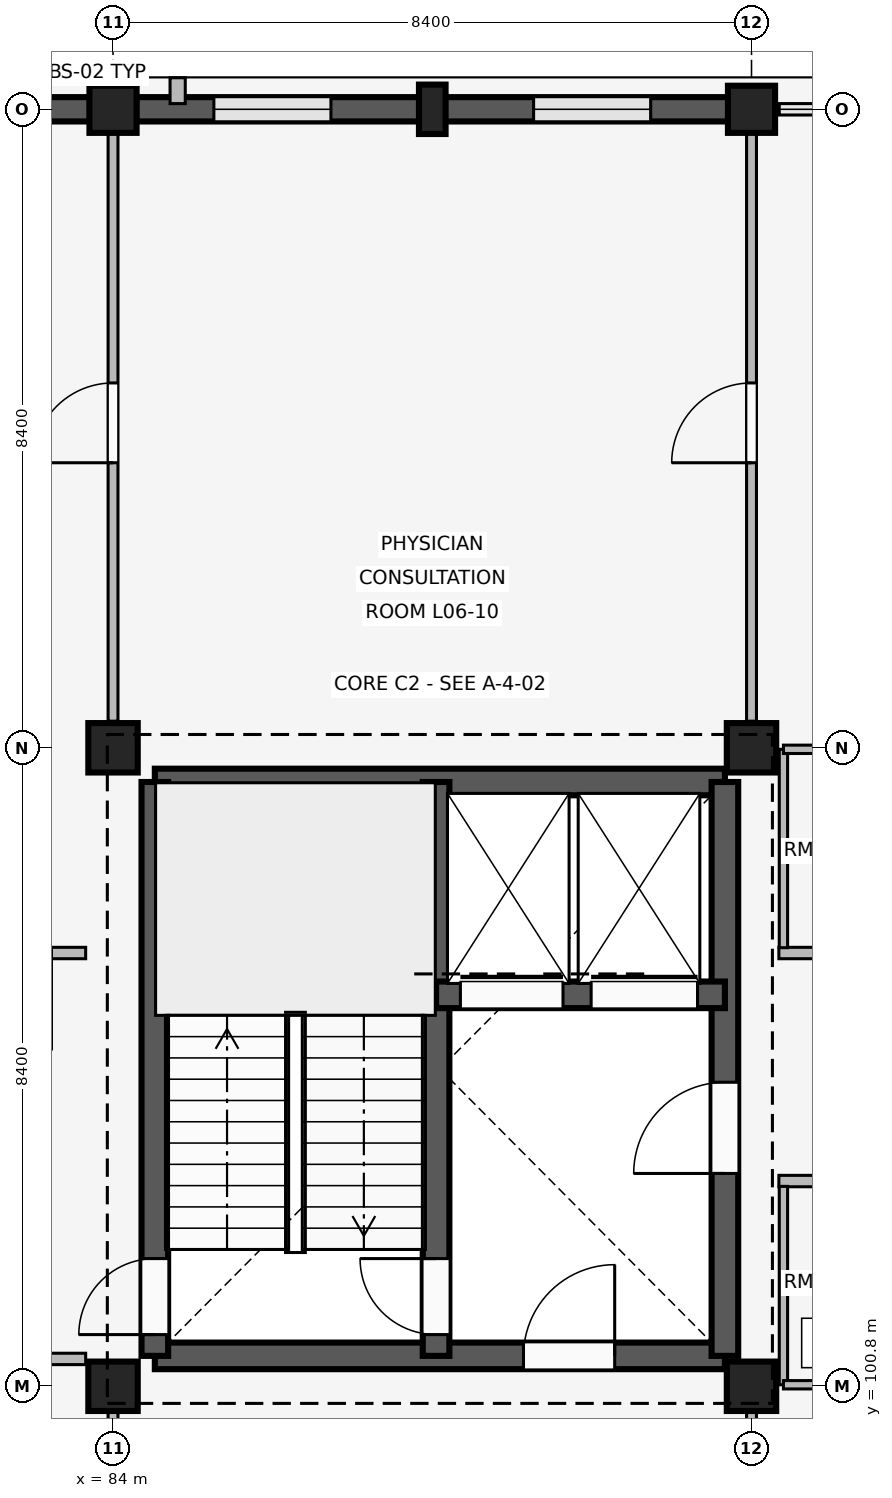
"""IFC4 building model, lengths in metres.
Left out: names, types, materials, properties, quantities, classifications, styles, units other than length and angle.
Written with IfcOpenShell. Run it as: python <this file> out.ifc"""

import sys

from ifc_helpers import new_model, si_unit, direction, frame, frame_2d, origin, origin_2d, place, context, subcontext, project, spatial, rectangle, extrude, element, fill, save


model = new_model("IFC4")
c1 = context("Model", 3, precision=1e-05, world=origin(), true_north=direction((0.0, 1.0)))
c2 = subcontext(c1, "Body", "Model", "MODEL_VIEW")
j1 = project(units=[si_unit("LENGTHUNIT", "METRE"), si_unit("PLANEANGLEUNIT", "RADIAN")], contexts=[c1])
p1 = place(None, origin())
s1 = spatial("IfcSite", under=j1, at=p1, CompositionType="ELEMENT")
p2 = place(p1, origin())
s2 = spatial("IfcBuilding", under=s1, at=p2, CompositionType="ELEMENT")
p3 = place(p2, frame((0.0, 0.0, 24.6)))
s3 = spatial("IfcBuildingStorey", under=s2, at=p3, CompositionType="ELEMENT", Elevation=24.6)
for number, where, z_axis, x_axis in (
    (1, (84.0, 100.8, 0.0), (0.0, 0.0, 1.0), (1.0, 0.0, 0.0)),
    (2, (84.0, 109.2, 0.0), (0.0, 0.0, 1.0), (1.0, 0.0, 0.0)),
):
    element("IfcColumn", number, at=place(p3, frame(where, z_axis=z_axis, x_axis=x_axis)), inside=s3, PredefinedType="COLUMN", context=c2, shape_type="SweptSolid", body=[
        extrude(rectangle(XDim=0.65, YDim=0.65, at=origin_2d()), origin(), (0.0, 0.0, 1.0), 4.2),
    ])
p4 = place(p3, frame((84.0, 117.6, 0.0), z_axis=(0.0, 0.0, 1.0), x_axis=(1.0, 0.0, 0.0)))
e3 = element("IfcColumn", 3, at=p4, inside=s3, PredefinedType="COLUMN", context=c2, shape_type="SweptSolid", body=[
    extrude(rectangle(XDim=0.62, YDim=0.62, at=origin_2d()), origin(), (0.0, 0.0, 1.0), 4.2),
])
for number, where, z_axis, x_axis in (
    (4, (92.4, 100.8, 0.0), (0.0, 0.0, 1.0), (1.0, 0.0, 0.0)),
    (5, (92.4, 109.2, 0.0), (0.0, 0.0, 1.0), (1.0, 0.0, 0.0)),
):
    element("IfcColumn", number, at=place(p3, frame(where, z_axis=z_axis, x_axis=x_axis)), inside=s3, PredefinedType="COLUMN", context=c2, shape_type="SweptSolid", body=[
        extrude(rectangle(XDim=0.65, YDim=0.65, at=origin_2d()), origin(), (0.0, 0.0, 1.0), 4.2),
    ])
p5 = place(p3, frame((92.4, 117.6, 0.0), z_axis=(0.0, 0.0, 1.0), x_axis=(1.0, 0.0, 0.0)))
e6 = element("IfcColumn", 6, at=p5, inside=s3, PredefinedType="COLUMN", context=c2, shape_type="SweptSolid", body=[
    extrude(rectangle(XDim=0.62, YDim=0.62, at=origin_2d()), origin(), (0.0, 0.0, 1.0), 4.2),
])
p6 = place(p3, frame((88.2, 117.6, 0.0), z_axis=(0.0, 0.0, 1.0), x_axis=(1.0, 0.0, 0.0)))
e7 = element("IfcColumn", 7, at=p6, inside=s3, PredefinedType="PILASTER", context=c2, shape_type="SweptSolid", body=[
    extrude(rectangle(XDim=0.35, YDim=0.65, at=origin_2d()), origin(), (0.0, 0.0, 1.0), 4.2),
])
p7 = place(p3, frame((75.905, 117.6, 0.0), z_axis=(0.0, 0.0, 1.0), x_axis=(1.0, 0.0, 0.0)))
e8 = element("IfcWall", 8, at=p7, inside=s3, PredefinedType="SOLIDWALL", context=c2, shape_type="SweptSolid", body=[
    extrude(rectangle(XDim=7.79, YDim=0.32, at=frame_2d((3.895, 0.0))), origin(), (0.0, 0.0, 1.0), 3.34),
])
p8 = place(p7, frame((0.962, 0.0, 0.85)))
e9 = element("IfcOpeningElement", 9, at=p8, cuts=e8, PredefinedType="OPENING", context=c2, shape_type="SweptSolid", body=[
    extrude(rectangle(XDim=1.66, YDim=1.95, at=frame_2d((0.83, 0.975))), frame((0.0, 0.17, 0.0), z_axis=(0.0, -1.0, 0.0), x_axis=(1.0, 0.0, 0.0)), (0.0, 0.0, 1.0), 0.34),
])
p9 = place(p7, frame((5.168, 0.0, 0.85)))
e10 = element("IfcOpeningElement", 10, at=p9, cuts=e8, PredefinedType="OPENING", context=c2, shape_type="SweptSolid", body=[
    extrude(rectangle(XDim=1.66, YDim=1.95, at=frame_2d((0.83, 0.975))), frame((0.0, 0.17, 0.0), z_axis=(0.0, -1.0, 0.0), x_axis=(1.0, 0.0, 0.0)), (0.0, 0.0, 1.0), 0.34),
])
p10 = place(p3, frame((84.305, 117.6, 0.0), z_axis=(0.0, 0.0, 1.0), x_axis=(1.0, 0.0, 0.0)))
e11 = element("IfcWall", 11, at=p10, inside=s3, PredefinedType="SOLIDWALL", context=c2, shape_type="SweptSolid", body=[
    extrude(rectangle(XDim=7.79, YDim=0.32, at=frame_2d((3.895, 0.0))), origin(), (0.0, 0.0, 1.0), 3.34),
])
p11 = place(p10, frame((1.022, 0.0, 0.85)))
e12 = element("IfcOpeningElement", 12, at=p11, cuts=e11, PredefinedType="OPENING", context=c2, shape_type="SweptSolid", body=[
    extrude(rectangle(XDim=1.54, YDim=1.85, at=frame_2d((0.77, 0.925))), frame((0.0, 0.17, 0.0), z_axis=(0.0, -1.0, 0.0), x_axis=(1.0, 0.0, 0.0)), (0.0, 0.0, 1.0), 0.34),
])
p12 = place(p10, frame((5.228, 0.0, 0.85)))
e13 = element("IfcOpeningElement", 13, at=p12, cuts=e11, PredefinedType="OPENING", context=c2, shape_type="SweptSolid", body=[
    extrude(rectangle(XDim=1.54, YDim=1.85, at=frame_2d((0.77, 0.925))), frame((0.0, 0.17, 0.0), z_axis=(0.0, -1.0, 0.0), x_axis=(1.0, 0.0, 0.0)), (0.0, 0.0, 1.0), 0.34),
])
p13 = place(p3, frame((84.85, 117.675, 0.0), z_axis=(0.0, 0.0, 1.0), x_axis=(0.0, 1.0, 0.0)))
e14 = element("IfcWall", 14, at=p13, inside=s3, PredefinedType="ELEMENTEDWALL", context=c2, shape_type="SweptSolid", body=[
    extrude(rectangle(XDim=0.34, YDim=0.2, at=frame_2d((0.17, 0.0))), origin(), (0.0, 0.0, 1.0), 3.32),
])
p14 = place(p3, frame((84.55, 101.2, 0.0), z_axis=(0.0, 0.0, 1.0), x_axis=(1.0, 0.0, 0.0)))
e15 = element("IfcWall", 15, at=p14, inside=s3, PredefinedType="SHEAR", context=c2, shape_type="SweptSolid", body=[
    extrude(rectangle(XDim=7.5, YDim=0.35, at=frame_2d((3.75, 0.0))), origin(), (0.0, 0.0, 1.0), 3.92),
])
p15 = place(p14, frame((4.85, 0.0, 0.0)))
e16 = element("IfcOpeningElement", 16, at=p15, cuts=e15, PredefinedType="OPENING", context=c2, shape_type="SweptSolid", body=[
    extrude(rectangle(XDim=1.2, YDim=2.2, at=frame_2d((0.6, 1.1))), frame((0.0, 0.185, 0.0), z_axis=(0.0, -1.0, 0.0), x_axis=(1.0, 0.0, 0.0)), (0.0, 0.0, 1.0), 0.37),
])
p16 = place(p3, frame((84.55, 108.75, 0.0), z_axis=(0.0, 0.0, 1.0), x_axis=(1.0, 0.0, 0.0)))
e17 = element("IfcWall", 17, at=p16, inside=s3, PredefinedType="SHEAR", context=c2, shape_type="SweptSolid", body=[
    extrude(rectangle(XDim=7.5, YDim=0.35, at=frame_2d((3.75, 0.0))), origin(), (0.0, 0.0, 1.0), 3.92),
])
p17 = place(p3, frame((84.55, 101.2, 0.0), z_axis=(0.0, 0.0, 1.0), x_axis=(0.0, 1.0, 0.0)))
e18 = element("IfcWall", 18, at=p17, inside=s3, PredefinedType="SHEAR", context=c2, shape_type="SweptSolid", body=[
    extrude(rectangle(XDim=7.55, YDim=0.35, at=frame_2d((3.775, 0.0))), origin(), (0.0, 0.0, 1.0), 3.92),
])
p18 = place(p17, frame((0.28, 0.0, 0.0)))
e19 = element("IfcOpeningElement", 19, at=p18, cuts=e18, PredefinedType="OPENING", context=c2, shape_type="SweptSolid", body=[
    extrude(rectangle(XDim=1.0, YDim=2.15, at=frame_2d((0.5, 1.075))), frame((0.0, 0.185, 0.0), z_axis=(0.0, -1.0, 0.0), x_axis=(1.0, 0.0, 0.0)), (0.0, 0.0, 1.0), 0.37),
])
p19 = place(p3, frame((92.05, 101.2, 0.0), z_axis=(0.0, 0.0, 1.0), x_axis=(0.0, 1.0, 0.0)))
e20 = element("IfcWall", 20, at=p19, inside=s3, PredefinedType="SHEAR", context=c2, shape_type="SweptSolid", body=[
    extrude(rectangle(XDim=7.55, YDim=0.35, at=frame_2d((3.775, 0.0))), origin(), (0.0, 0.0, 1.0), 3.92),
])
p20 = place(p19, frame((2.4, 0.0, 0.0)))
e21 = element("IfcOpeningElement", 21, at=p20, cuts=e20, PredefinedType="OPENING", context=c2, shape_type="SweptSolid", body=[
    extrude(rectangle(XDim=1.2, YDim=2.2, at=frame_2d((0.6, 1.1))), frame((0.0, 0.185, 0.0), z_axis=(0.0, -1.0, 0.0), x_axis=(1.0, 0.0, 0.0)), (0.0, 0.0, 1.0), 0.37),
])
p21 = place(p3, frame((88.25, 101.2, 0.0), z_axis=(0.0, 0.0, 1.0), x_axis=(0.0, 1.0, 0.0)))
e22 = element("IfcWall", 22, at=p21, inside=s3, PredefinedType="SHEAR", context=c2, shape_type="SweptSolid", body=[
    extrude(rectangle(XDim=7.55, YDim=0.35, at=frame_2d((3.775, 0.0))), origin(), (0.0, 0.0, 1.0), 3.92),
])
p22 = place(p21, frame((0.28, 0.0, 0.0)))
e23 = element("IfcOpeningElement", 23, at=p22, cuts=e22, PredefinedType="OPENING", context=c2, shape_type="SweptSolid", body=[
    extrude(rectangle(XDim=1.0, YDim=2.15, at=frame_2d((0.5, 1.075))), frame((0.0, 0.185, 0.0), z_axis=(0.0, -1.0, 0.0), x_axis=(1.0, 0.0, 0.0)), (0.0, 0.0, 1.0), 0.37),
])
p23 = place(p3, frame((88.25, 105.95, 0.0), z_axis=(0.0, 0.0, 1.0), x_axis=(1.0, 0.0, 0.0)))
e24 = element("IfcWall", 24, at=p23, inside=s3, PredefinedType="SHEAR", context=c2, shape_type="SweptSolid", body=[
    extrude(rectangle(XDim=3.8, YDim=0.35, at=frame_2d((1.9, 0.0))), origin(), (0.0, 0.0, 1.0), 3.92),
])
p24 = place(p23, frame((0.32, 0.0, 0.0)))
e25 = element("IfcOpeningElement", 25, at=p24, cuts=e24, PredefinedType="OPENING", context=c2, shape_type="SweptSolid", body=[
    extrude(rectangle(XDim=1.35, YDim=2.25, at=frame_2d((0.675, 1.125))), frame((0.0, 0.185, 0.0), z_axis=(0.0, -1.0, 0.0), x_axis=(1.0, 0.0, 0.0)), (0.0, 0.0, 1.0), 0.37),
])
p25 = place(p23, frame((2.04, 0.0, 0.0)))
e26 = element("IfcOpeningElement", 26, at=p25, cuts=e24, PredefinedType="OPENING", context=c2, shape_type="SweptSolid", body=[
    extrude(rectangle(XDim=1.4, YDim=2.25, at=frame_2d((0.7, 1.125))), frame((0.0, 0.185, 0.0), z_axis=(0.0, -1.0, 0.0), x_axis=(1.0, 0.0, 0.0)), (0.0, 0.0, 1.0), 0.37),
])
p26 = place(p3, frame((81.46, 101.16, 0.0), z_axis=(0.0, 0.0, 1.0), x_axis=(1.0, 0.0, 0.0)))
e27 = element("IfcWall", 27, at=p26, inside=s3, PredefinedType="PARTITIONING", context=c2, shape_type="SweptSolid", body=[
    extrude(rectangle(XDim=2.18, YDim=0.15, at=frame_2d((1.09, 0.0))), origin(), (0.0, 0.0, 1.0), 3.32),
])
p27 = place(p26, frame((0.5, 0.0, 0.0)))
e28 = element("IfcOpeningElement", 28, at=p27, cuts=e27, PredefinedType="OPENING", context=c2, shape_type="SweptSolid", body=[
    extrude(rectangle(XDim=1.08, YDim=2.15, at=frame_2d((0.54, 1.075))), frame((0.0, 0.085, 0.0), z_axis=(0.0, -1.0, 0.0), x_axis=(1.0, 0.0, 0.0)), (0.0, 0.0, 1.0), 0.17),
])
p28 = place(p3, frame((83.64, 106.5, 0.0), z_axis=(0.0, 0.0, 1.0), x_axis=(-1.0, 0.0, 0.0)))
e29 = element("IfcWall", 29, at=p28, inside=s3, PredefinedType="PARTITIONING", context=c2, shape_type="SweptSolid", body=[
    extrude(rectangle(XDim=7.96, YDim=0.15, at=frame_2d((3.98, 0.0))), origin(), (0.0, 0.0, 1.0), 3.32),
])
p29 = place(p28, frame((0.45, 0.0, 0.0)))
e30 = element("IfcOpeningElement", 30, at=p29, cuts=e29, PredefinedType="OPENING", context=c2, shape_type="SweptSolid", body=[
    extrude(rectangle(XDim=1.28, YDim=2.2, at=frame_2d((0.64, 1.1))), frame((0.0, 0.085, 0.0), z_axis=(0.0, -1.0, 0.0), x_axis=(1.0, 0.0, 0.0)), (0.0, 0.0, 1.0), 0.17),
])
p30 = place(p28, frame((4.15, 0.0, 0.0)))
e31 = element("IfcOpeningElement", 31, at=p30, cuts=e29, PredefinedType="OPENING", context=c2, shape_type="SweptSolid", body=[
    extrude(rectangle(XDim=1.28, YDim=2.2, at=frame_2d((0.64, 1.1))), frame((0.0, 0.085, 0.0), z_axis=(0.0, -1.0, 0.0), x_axis=(1.0, 0.0, 0.0)), (0.0, 0.0, 1.0), 0.17),
])
p31 = place(p3, frame((84.0, 92.54, 0.0), z_axis=(0.0, 0.0, 1.0), x_axis=(0.0, 1.0, 0.0)))
e32 = element("IfcWall", 32, at=p31, inside=s3, PredefinedType="PARTITIONING", context=c2, shape_type="SweptSolid", body=[
    extrude(rectangle(XDim=8.21, YDim=0.13, at=frame_2d((4.105, 0.0))), origin(), (0.0, 0.0, 1.0), 3.32),
])
p32 = place(p31, frame((3.64, 0.0, 0.0)))
e33 = element("IfcOpeningElement", 33, at=p32, cuts=e32, PredefinedType="OPENING", context=c2, shape_type="SweptSolid", body=[
    extrude(rectangle(XDim=1.08, YDim=2.15, at=frame_2d((0.54, 1.075))), frame((0.0, 0.075, 0.0), z_axis=(0.0, -1.0, 0.0), x_axis=(1.0, 0.0, 0.0)), (0.0, 0.0, 1.0), 0.15),
])
p33 = place(p3, frame((84.0, 109.55, 0.0), z_axis=(0.0, 0.0, 1.0), x_axis=(0.0, 1.0, 0.0)))
e34 = element("IfcWall", 34, at=p33, inside=s3, PredefinedType="PARTITIONING", context=c2, shape_type="SweptSolid", body=[
    extrude(rectangle(XDim=7.91, YDim=0.13, at=frame_2d((3.955, 0.0))), origin(), (0.0, 0.0, 1.0), 3.32),
])
p34 = place(p33, frame((3.4, 0.0, 0.0)))
e35 = element("IfcOpeningElement", 35, at=p34, cuts=e34, PredefinedType="OPENING", context=c2, shape_type="SweptSolid", body=[
    extrude(rectangle(XDim=1.05, YDim=2.2, at=frame_2d((0.525, 1.1))), frame((0.0, 0.075, 0.0), z_axis=(0.0, -1.0, 0.0), x_axis=(1.0, 0.0, 0.0)), (0.0, 0.0, 1.0), 0.15),
])
p35 = place(p3, frame((92.4, 92.54, 0.0), z_axis=(0.0, 0.0, 1.0), x_axis=(0.0, 1.0, 0.0)))
e36 = element("IfcWall", 36, at=p35, inside=s3, PredefinedType="PARTITIONING", context=c2, shape_type="SweptSolid", body=[
    extrude(rectangle(XDim=8.21, YDim=0.13, at=frame_2d((4.105, 0.0))), origin(), (0.0, 0.0, 1.0), 3.32),
])
p36 = place(p35, frame((3.64, 0.0, 0.0)))
e37 = element("IfcOpeningElement", 37, at=p36, cuts=e36, PredefinedType="OPENING", context=c2, shape_type="SweptSolid", body=[
    extrude(rectangle(XDim=1.08, YDim=2.15, at=frame_2d((0.54, 1.075))), frame((0.0, 0.075, 0.0), z_axis=(0.0, -1.0, 0.0), x_axis=(1.0, 0.0, 0.0)), (0.0, 0.0, 1.0), 0.15),
])
p37 = place(p3, frame((92.4, 109.55, 0.0), z_axis=(0.0, 0.0, 1.0), x_axis=(0.0, 1.0, 0.0)))
e38 = element("IfcWall", 38, at=p37, inside=s3, PredefinedType="PARTITIONING", context=c2, shape_type="SweptSolid", body=[
    extrude(rectangle(XDim=7.91, YDim=0.13, at=frame_2d((3.955, 0.0))), origin(), (0.0, 0.0, 1.0), 3.32),
])
p38 = place(p37, frame((3.4, 0.0, 0.0)))
e39 = element("IfcOpeningElement", 39, at=p38, cuts=e38, PredefinedType="OPENING", context=c2, shape_type="SweptSolid", body=[
    extrude(rectangle(XDim=1.05, YDim=2.2, at=frame_2d((0.525, 1.1))), frame((0.0, 0.075, 0.0), z_axis=(0.0, -1.0, 0.0), x_axis=(1.0, 0.0, 0.0)), (0.0, 0.0, 1.0), 0.15),
])
p39 = place(p3, frame((92.76, 103.5, 0.0), z_axis=(0.0, 0.0, 1.0), x_axis=(1.0, 0.0, 0.0)))
e40 = element("IfcWall", 40, at=p39, inside=s3, PredefinedType="PARTITIONING", context=c2, shape_type="SweptSolid", body=[
    extrude(rectangle(XDim=7.96, YDim=0.15, at=frame_2d((3.98, 0.0))), origin(), (0.0, 0.0, 1.0), 3.32),
])
p40 = place(p39, frame((2.25, 0.0, 0.0)))
e41 = element("IfcOpeningElement", 41, at=p40, cuts=e40, PredefinedType="OPENING", context=c2, shape_type="SweptSolid", body=[
    extrude(rectangle(XDim=1.28, YDim=2.2, at=frame_2d((0.64, 1.1))), frame((0.0, 0.085, 0.0), z_axis=(0.0, -1.0, 0.0), x_axis=(1.0, 0.0, 0.0)), (0.0, 0.0, 1.0), 0.17),
])
p41 = place(p39, frame((5.95, 0.0, 0.0)))
e42 = element("IfcOpeningElement", 42, at=p41, cuts=e40, PredefinedType="OPENING", context=c2, shape_type="SweptSolid", body=[
    extrude(rectangle(XDim=1.28, YDim=2.2, at=frame_2d((0.64, 1.1))), frame((0.0, 0.085, 0.0), z_axis=(0.0, -1.0, 0.0), x_axis=(1.0, 0.0, 0.0)), (0.0, 0.0, 1.0), 0.17),
])
p42 = place(p3, frame((92.82, 100.82, 0.0), z_axis=(0.0, 0.0, 1.0), x_axis=(0.0, 1.0, 0.0)))
e43 = element("IfcWall", 43, at=p42, inside=s3, PredefinedType="PARTITIONING", context=c2, shape_type="SweptSolid", body=[
    extrude(rectangle(XDim=2.61, YDim=0.11, at=frame_2d((1.305, 0.0))), origin(), (0.0, 0.0, 1.0), 3.32),
])
p43 = place(p3, frame((92.82, 100.82, 0.0), z_axis=(0.0, 0.0, 1.0), x_axis=(1.0, 0.0, 0.0)))
e44 = element("IfcWall", 44, at=p43, inside=s3, PredefinedType="PARTITIONING", context=c2, shape_type="SweptSolid", body=[
    extrude(rectangle(XDim=1.98, YDim=0.11, at=frame_2d((0.99, 0.0))), origin(), (0.0, 0.0, 1.0), 3.32),
])
p44 = place(p43, frame((0.54, 0.0, 0.0)))
e45 = element("IfcOpeningElement", 45, at=p44, cuts=e44, PredefinedType="OPENING", context=c2, shape_type="SweptSolid", body=[
    extrude(rectangle(XDim=0.9, YDim=2.1, at=frame_2d((0.45, 1.05))), frame((0.0, 0.065, 0.0), z_axis=(0.0, -1.0, 0.0), x_axis=(1.0, 0.0, 0.0)), (0.0, 0.0, 1.0), 0.13),
])
p45 = place(p3, frame((100.72, 106.5, 0.0), z_axis=(0.0, 0.0, 1.0), x_axis=(-1.0, 0.0, 0.0)))
e46 = element("IfcWall", 46, at=p45, inside=s3, PredefinedType="PARTITIONING", context=c2, shape_type="SweptSolid", body=[
    extrude(rectangle(XDim=7.96, YDim=0.15, at=frame_2d((3.98, 0.0))), origin(), (0.0, 0.0, 1.0), 3.32),
])
p46 = place(p45, frame((0.73, 0.0, 0.0)))
e47 = element("IfcOpeningElement", 47, at=p46, cuts=e46, PredefinedType="OPENING", context=c2, shape_type="SweptSolid", body=[
    extrude(rectangle(XDim=1.28, YDim=2.2, at=frame_2d((0.64, 1.1))), frame((0.0, 0.085, 0.0), z_axis=(0.0, -1.0, 0.0), x_axis=(1.0, 0.0, 0.0)), (0.0, 0.0, 1.0), 0.17),
])
p47 = place(p45, frame((4.43, 0.0, 0.0)))
e48 = element("IfcOpeningElement", 48, at=p47, cuts=e46, PredefinedType="OPENING", context=c2, shape_type="SweptSolid", body=[
    extrude(rectangle(XDim=1.28, YDim=2.2, at=frame_2d((0.64, 1.1))), frame((0.0, 0.085, 0.0), z_axis=(0.0, -1.0, 0.0), x_axis=(1.0, 0.0, 0.0)), (0.0, 0.0, 1.0), 0.17),
])
p48 = place(p3, frame((92.82, 106.57, 0.0), z_axis=(0.0, 0.0, 1.0), x_axis=(0.0, 1.0, 0.0)))
e49 = element("IfcWall", 49, at=p48, inside=s3, PredefinedType="PARTITIONING", context=c2, shape_type="SweptSolid", body=[
    extrude(rectangle(XDim=2.61, YDim=0.11, at=frame_2d((1.305, 0.0))), origin(), (0.0, 0.0, 1.0), 3.32),
])
p49 = place(p3, frame((92.82, 109.18, 0.0), z_axis=(0.0, 0.0, 1.0), x_axis=(1.0, 0.0, 0.0)))
e50 = element("IfcWall", 50, at=p49, inside=s3, PredefinedType="PARTITIONING", context=c2, shape_type="SweptSolid", body=[
    extrude(rectangle(XDim=1.98, YDim=0.11, at=frame_2d((0.99, 0.0))), origin(), (0.0, 0.0, 1.0), 3.32),
])
p50 = place(p49, frame((0.54, 0.0, 0.0)))
e51 = element("IfcOpeningElement", 51, at=p50, cuts=e50, PredefinedType="OPENING", context=c2, shape_type="SweptSolid", body=[
    extrude(rectangle(XDim=0.9, YDim=2.1, at=frame_2d((0.45, 1.05))), frame((0.0, 0.065, 0.0), z_axis=(0.0, -1.0, 0.0), x_axis=(1.0, 0.0, 0.0)), (0.0, 0.0, 1.0), 0.13),
])
p51 = place(p11, origin())
e52 = element("IfcWindow", 52, at=p51, inside=s3, PartitioningType="SINGLE_PANEL", PredefinedType="WINDOW", context=c2, shape_type="SweptSolid", body=[
    extrude(rectangle(XDim=1.54, YDim=1.85, at=frame_2d((0.77, 0.925))), frame((0.0, 0.03, 0.0), z_axis=(0.0, -1.0, 0.0), x_axis=(1.0, 0.0, 0.0)), (0.0, 0.0, 1.0), 0.06),
])
fill(e12, e52)
p52 = place(p12, origin())
e53 = element("IfcWindow", 53, at=p52, inside=s3, PartitioningType="SINGLE_PANEL", PredefinedType="WINDOW", context=c2, shape_type="SweptSolid", body=[
    extrude(rectangle(XDim=1.54, YDim=1.85, at=frame_2d((0.77, 0.925))), frame((0.0, 0.03, 0.0), z_axis=(0.0, -1.0, 0.0), x_axis=(1.0, 0.0, 0.0)), (0.0, 0.0, 1.0), 0.06),
])
fill(e13, e53)
p53 = place(p20, origin())
e54 = element("IfcDoor", 54, at=p53, inside=s3, OperationType="SINGLE_SWING_LEFT", PredefinedType="DOOR", context=c2, shape_type="SweptSolid", body=[
    extrude(rectangle(XDim=1.2, YDim=2.2, at=frame_2d((0.6, 1.1))), frame((0.0, 0.025, 0.0), z_axis=(0.0, -1.0, 0.0), x_axis=(1.0, 0.0, 0.0)), (0.0, 0.0, 1.0), 0.05),
])
fill(e21, e54)
p54 = place(p15, origin())
e55 = element("IfcDoor", 55, at=p54, inside=s3, OperationType="SINGLE_SWING_RIGHT", PredefinedType="DOOR", context=c2, shape_type="SweptSolid", body=[
    extrude(rectangle(XDim=1.2, YDim=2.2, at=frame_2d((0.6, 1.1))), frame((0.0, 0.025, 0.0), z_axis=(0.0, -1.0, 0.0), x_axis=(1.0, 0.0, 0.0)), (0.0, 0.0, 1.0), 0.05),
])
fill(e16, e55)
p55 = place(p18, origin())
e56 = element("IfcDoor", 56, at=p55, inside=s3, OperationType="SINGLE_SWING_LEFT", PredefinedType="DOOR", context=c2, shape_type="SweptSolid", body=[
    extrude(rectangle(XDim=1.0, YDim=2.15, at=frame_2d((0.5, 1.075))), frame((0.0, 0.025, 0.0), z_axis=(0.0, -1.0, 0.0), x_axis=(1.0, 0.0, 0.0)), (0.0, 0.0, 1.0), 0.05),
])
fill(e19, e56)
p56 = place(p22, origin())
e57 = element("IfcDoor", 57, at=p56, inside=s3, OperationType="SINGLE_SWING_RIGHT", PredefinedType="DOOR", context=c2, shape_type="SweptSolid", body=[
    extrude(rectangle(XDim=1.0, YDim=2.15, at=frame_2d((0.5, 1.075))), frame((0.0, 0.025, 0.0), z_axis=(0.0, -1.0, 0.0), x_axis=(1.0, 0.0, 0.0)), (0.0, 0.0, 1.0), 0.05),
])
fill(e23, e57)
p57 = place(p24, origin())
e58 = element("IfcDoor", 58, at=p57, inside=s3, OperationType="SLIDING_TO_LEFT", PredefinedType="DOOR", context=c2, shape_type="SweptSolid", body=[
    extrude(rectangle(XDim=1.35, YDim=2.25, at=frame_2d((0.675, 1.125))), frame((0.0, 0.025, 0.0), z_axis=(0.0, -1.0, 0.0), x_axis=(1.0, 0.0, 0.0)), (0.0, 0.0, 1.0), 0.05),
])
fill(e25, e58)
p58 = place(p25, origin())
e59 = element("IfcDoor", 59, at=p58, inside=s3, OperationType="SLIDING_TO_LEFT", PredefinedType="DOOR", context=c2, shape_type="SweptSolid", body=[
    extrude(rectangle(XDim=1.4, YDim=2.25, at=frame_2d((0.7, 1.125))), frame((0.0, 0.025, 0.0), z_axis=(0.0, -1.0, 0.0), x_axis=(1.0, 0.0, 0.0)), (0.0, 0.0, 1.0), 0.05),
])
fill(e26, e59)
p59 = place(p34, origin())
e60 = element("IfcDoor", 60, at=p59, inside=s3, OperationType="SINGLE_SWING_LEFT", PredefinedType="DOOR", context=c2, shape_type="SweptSolid", body=[
    extrude(rectangle(XDim=1.05, YDim=2.2, at=frame_2d((0.525, 1.1))), frame((0.0, 0.025, 0.0), z_axis=(0.0, -1.0, 0.0), x_axis=(1.0, 0.0, 0.0)), (0.0, 0.0, 1.0), 0.05),
])
fill(e35, e60)
p60 = place(p38, origin())
e61 = element("IfcDoor", 61, at=p60, inside=s3, OperationType="SINGLE_SWING_LEFT", PredefinedType="DOOR", context=c2, shape_type="SweptSolid", body=[
    extrude(rectangle(XDim=1.05, YDim=2.2, at=frame_2d((0.525, 1.1))), frame((0.0, 0.025, 0.0), z_axis=(0.0, -1.0, 0.0), x_axis=(1.0, 0.0, 0.0)), (0.0, 0.0, 1.0), 0.05),
])
fill(e39, e61)
save(model, sys.argv[1])
